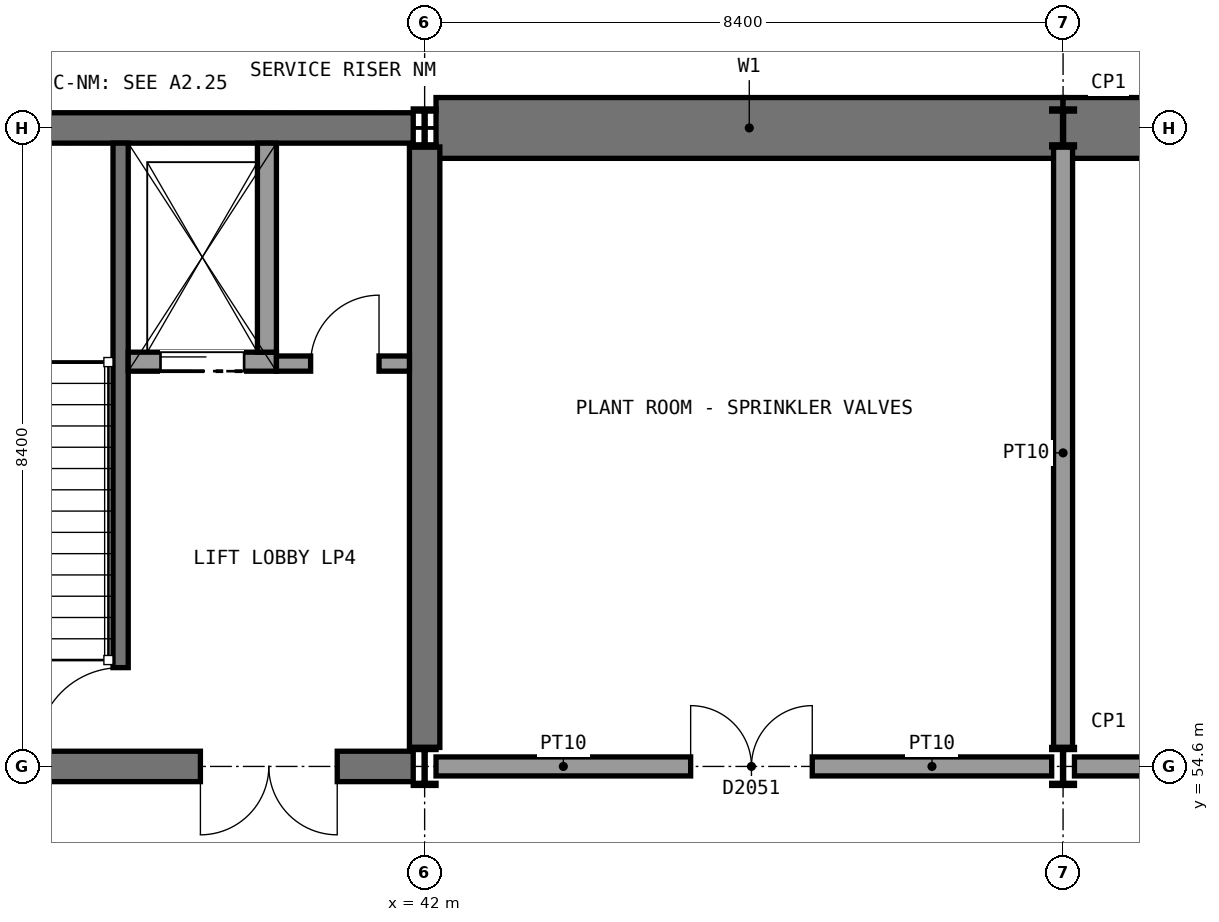
"""IFC4 building model, lengths in metres.
Left out: names, types, materials, properties, quantities, classifications, styles, units other than length and angle.
Written with IfcOpenShell. Run it as: python <this file> out.ifc"""

import sys

from ifc_helpers import new_model, si_unit, direction, frame, frame_2d, origin, origin_2d, place, context, subcontext, project, spatial, rectangle, i_section, extrude, element, fill, save


model = new_model("IFC4")
c1 = context("Model", 3, precision=1e-05, world=origin(), true_north=direction((0.0, 1.0)))
c2 = subcontext(c1, "Body", "Model", "MODEL_VIEW")
j1 = project(units=[si_unit("LENGTHUNIT", "METRE"), si_unit("PLANEANGLEUNIT", "RADIAN")], contexts=[c1])
p1 = place(None, origin())
s1 = spatial("IfcSite", under=j1, at=p1, CompositionType="ELEMENT")
p2 = place(p1, origin())
s2 = spatial("IfcBuilding", under=s1, at=p2, CompositionType="ELEMENT")
p3 = place(p2, frame((0.0, 0.0, -9.9)))
s3 = spatial("IfcBuildingStorey", under=s2, at=p3, CompositionType="ELEMENT", Elevation=-9.9)
p4 = place(p3, frame((42.15, 63.0, 0.0), z_axis=(0.0, 0.0, 1.0), x_axis=(1.0, 0.0, 0.0)))
e1 = element("IfcWall", 1, at=p4, inside=s3, PredefinedType="SOLIDWALL", context=c2, shape_type="SweptSolid", body=[
    extrude(rectangle(XDim=8.25, YDim=0.8, at=frame_2d((4.125, 0.0))), origin(), (0.0, 0.0, 1.0), 4.65),
])
p5 = place(p3, frame((50.4, 63.0, 0.0), z_axis=(0.0, 0.0, 1.0), x_axis=(1.0, 0.0, 0.0)))
e2 = element("IfcWall", 2, at=p5, inside=s3, PredefinedType="SOLIDWALL", context=c2, shape_type="SweptSolid", body=[
    extrude(rectangle(XDim=8.25, YDim=0.8, at=frame_2d((4.125, 0.0))), origin(), (0.0, 0.0, 1.0), 4.65),
])
p6 = place(p3, frame((33.75, 63.0, 0.0), z_axis=(0.0, 0.0, 1.0), x_axis=(1.0, 0.0, 0.0)))
e3 = element("IfcWall", 3, at=p6, inside=s3, PredefinedType="SHEAR", context=c2, shape_type="SweptSolid", body=[
    extrude(rectangle(XDim=8.1, YDim=0.4, at=frame_2d((4.05, 0.0))), origin(), (0.0, 0.0, 1.0), 4.65),
])
p7 = place(p3, frame((33.75, 54.6, 0.0), z_axis=(0.0, 0.0, 1.0), x_axis=(1.0, 0.0, 0.0)))
e4 = element("IfcWall", 4, at=p7, inside=s3, PredefinedType="SHEAR", context=c2, shape_type="SweptSolid", body=[
    extrude(rectangle(XDim=8.1, YDim=0.4, at=frame_2d((4.05, 0.0))), origin(), (0.0, 0.0, 1.0), 4.65),
])
p8 = place(p7, frame((1.15, 0.0, 0.0)))
e5 = element("IfcOpeningElement", 5, at=p8, cuts=e4, PredefinedType="OPENING", context=c2, shape_type="SweptSolid", body=[
    extrude(rectangle(XDim=1.8, YDim=2.1, at=frame_2d((0.9, 1.05))), frame((0.0, 0.21, 0.0), z_axis=(0.0, -1.0, 0.0), x_axis=(1.0, 0.0, 0.0)), (0.0, 0.0, 1.0), 0.42),
])
p9 = place(p7, frame((5.3, 0.0, 0.0)))
e6 = element("IfcOpeningElement", 6, at=p9, cuts=e4, PredefinedType="OPENING", context=c2, shape_type="SweptSolid", body=[
    extrude(rectangle(XDim=1.8, YDim=2.1, at=frame_2d((0.9, 1.05))), frame((0.0, 0.21, 0.0), z_axis=(0.0, -1.0, 0.0), x_axis=(1.0, 0.0, 0.0)), (0.0, 0.0, 1.0), 0.42),
])
p10 = place(p3, frame((42.0, 54.85, 0.0), z_axis=(0.0, 0.0, 1.0), x_axis=(0.0, 1.0, 0.0)))
e7 = element("IfcWall", 7, at=p10, inside=s3, PredefinedType="SHEAR", context=c2, shape_type="SweptSolid", body=[
    extrude(rectangle(XDim=7.9, YDim=0.4, at=frame_2d((3.95, 0.0))), origin(), (0.0, 0.0, 1.0), 4.65),
])
for number, where, z_axis, x_axis in (
    (8, (42.0, 54.6, 0.0), (0.0, 0.0, 1.0), (1.0, 0.0, 0.0)),
    (9, (42.0, 63.0, 0.0), (0.0, 0.0, 1.0), (1.0, 0.0, 0.0)),
    (10, (50.4, 54.6, 0.0), (0.0, 0.0, 1.0), (1.0, 0.0, 0.0)),
    (11, (50.4, 63.0, 0.0), (0.0, 0.0, 1.0), (1.0, 0.0, 0.0)),
):
    element("IfcColumn", number, at=place(p3, frame(where, z_axis=z_axis, x_axis=x_axis)), inside=s3, PredefinedType="COLUMN", context=c2, shape_type="SweptSolid", body=[
        extrude(i_section(OverallWidth=0.3, OverallDepth=0.5, WebThickness=0.014, FlangeThickness=0.028, FilletRadius=0.027, at=origin_2d()), origin(), (0.0, 0.0, 1.0), 5.0),
    ])
p11 = place(p3, frame((42.15, 54.6, 0.0), z_axis=(0.0, 0.0, 1.0), x_axis=(1.0, 0.0, 0.0)))
e12 = element("IfcWall", 12, at=p11, inside=s3, PredefinedType="SOLIDWALL", context=c2, shape_type="SweptSolid", body=[
    extrude(rectangle(XDim=8.1, YDim=0.25, at=frame_2d((4.05, 0.0))), origin(), (0.0, 0.0, 1.0), 4.65),
])
p12 = place(p11, frame((3.35, 0.0, 0.0)))
e13 = element("IfcOpeningElement", 13, at=p12, cuts=e12, PredefinedType="OPENING", context=c2, shape_type="SweptSolid", body=[
    extrude(rectangle(XDim=1.6, YDim=2.2, at=frame_2d((0.8, 1.1))), frame((0.0, 0.135, 0.0), z_axis=(0.0, -1.0, 0.0), x_axis=(1.0, 0.0, 0.0)), (0.0, 0.0, 1.0), 0.27),
])
p13 = place(p3, frame((50.55, 54.6, 0.0), z_axis=(0.0, 0.0, 1.0), x_axis=(1.0, 0.0, 0.0)))
e14 = element("IfcWall", 14, at=p13, inside=s3, PredefinedType="SOLIDWALL", context=c2, shape_type="SweptSolid", body=[
    extrude(rectangle(XDim=8.1, YDim=0.25, at=frame_2d((4.05, 0.0))), origin(), (0.0, 0.0, 1.0), 4.65),
])
p14 = place(p13, frame((3.35, 0.0, 0.0)))
e15 = element("IfcOpeningElement", 15, at=p14, cuts=e14, PredefinedType="OPENING", context=c2, shape_type="SweptSolid", body=[
    extrude(rectangle(XDim=1.6, YDim=2.2, at=frame_2d((0.8, 1.1))), frame((0.0, 0.135, 0.0), z_axis=(0.0, -1.0, 0.0), x_axis=(1.0, 0.0, 0.0)), (0.0, 0.0, 1.0), 0.27),
])
p15 = place(p3, frame((50.4, 54.85, 0.0), z_axis=(0.0, 0.0, 1.0), x_axis=(0.0, 1.0, 0.0)))
e16 = element("IfcWall", 16, at=p15, inside=s3, PredefinedType="SOLIDWALL", context=c2, shape_type="SweptSolid", body=[
    extrude(rectangle(XDim=7.9, YDim=0.25, at=frame_2d((3.95, 0.0))), origin(), (0.0, 0.0, 1.0), 4.65),
])
p16 = place(p3, frame((38.0, 62.8, 0.0), z_axis=(0.0, 0.0, 1.0), x_axis=(0.0, -1.0, 0.0)))
e17 = element("IfcWall", 17, at=p16, inside=s3, PredefinedType="SHEAR", context=c2, shape_type="SweptSolid", body=[
    extrude(rectangle(XDim=8.0, YDim=0.2, at=frame_2d((4.0, 0.0))), origin(), (0.0, 0.0, 1.0), 4.65),
])
p17 = place(p16, frame((6.9, 0.0, 0.0)))
e18 = element("IfcOpeningElement", 18, at=p17, cuts=e17, PredefinedType="OPENING", context=c2, shape_type="SweptSolid", body=[
    extrude(rectangle(XDim=1.11, YDim=2.1, at=frame_2d((0.555, 1.05))), frame((0.0, 0.11, 0.0), z_axis=(0.0, -1.0, 0.0), x_axis=(1.0, 0.0, 0.0)), (0.0, 0.0, 1.0), 0.22),
])
p18 = place(p3, frame((38.1, 59.925, -1.4), z_axis=(0.0, 0.0, 1.0), x_axis=(1.0, 0.0, 0.0)))
e19 = element("IfcWall", 19, at=p18, inside=s3, PredefinedType="SOLIDWALL", context=c2, shape_type="SweptSolid", body=[
    extrude(rectangle(XDim=1.95, YDim=0.25, at=frame_2d((0.975, 0.0))), origin(), (0.0, 0.0, 1.0), 6.4),
])
p19 = place(p18, frame((0.425, 0.0, 1.4)))
e20 = element("IfcOpeningElement", 20, at=p19, cuts=e19, PredefinedType="OPENING", context=c2, shape_type="SweptSolid", body=[
    extrude(rectangle(XDim=1.1, YDim=2.1, at=frame_2d((0.55, 1.05))), frame((0.0, 0.135, 0.0), z_axis=(0.0, -1.0, 0.0), x_axis=(1.0, 0.0, 0.0)), (0.0, 0.0, 1.0), 0.27),
])
p20 = place(p3, frame((39.925, 62.8, -1.4), z_axis=(0.0, 0.0, 1.0), x_axis=(0.0, -1.0, 0.0)))
e21 = element("IfcWall", 21, at=p20, inside=s3, PredefinedType="SOLIDWALL", context=c2, shape_type="SweptSolid", body=[
    extrude(rectangle(XDim=2.75, YDim=0.25, at=frame_2d((1.375, 0.0))), origin(), (0.0, 0.0, 1.0), 6.4),
])
p21 = place(p3, frame((40.05, 59.9, 0.0), z_axis=(0.0, 0.0, 1.0), x_axis=(1.0, 0.0, 0.0)))
e22 = element("IfcWall", 22, at=p21, inside=s3, PredefinedType="PARTITIONING", context=c2, shape_type="SweptSolid", body=[
    extrude(rectangle(XDim=1.75, YDim=0.2, at=frame_2d((0.875, 0.0))), origin(), (0.0, 0.0, 1.0), 4.65),
])
p22 = place(p21, frame((0.45, 0.0, 0.0)))
e23 = element("IfcOpeningElement", 23, at=p22, cuts=e22, PredefinedType="OPENING", context=c2, shape_type="SweptSolid", body=[
    extrude(rectangle(XDim=0.9, YDim=2.1, at=frame_2d((0.45, 1.05))), frame((0.0, 0.11, 0.0), z_axis=(0.0, -1.0, 0.0), x_axis=(1.0, 0.0, 0.0)), (0.0, 0.0, 1.0), 0.22),
])
p23 = place(p12, origin())
e24 = element("IfcDoor", 24, at=p23, inside=s3, OperationType="DOUBLE_DOOR_SINGLE_SWING", PredefinedType="DOOR", context=c2, shape_type="SweptSolid", body=[
    extrude(rectangle(XDim=1.6, YDim=2.2, at=frame_2d((0.8, 1.1))), frame((0.0, 0.025, 0.0), z_axis=(0.0, -1.0, 0.0), x_axis=(1.0, 0.0, 0.0)), (0.0, 0.0, 1.0), 0.05),
])
fill(e13, e24)
p24 = place(p17, frame((1.1, 0.0, 0.0), z_axis=(0.0, 0.0, 1.0), x_axis=(-1.0, 0.0, 0.0)))
e25 = element("IfcDoor", 25, at=p24, inside=s3, OperationType="SINGLE_SWING_LEFT", PredefinedType="DOOR", context=c2, shape_type="SweptSolid", body=[
    extrude(rectangle(XDim=1.1, YDim=2.1, at=frame_2d((0.55, 1.05))), frame((0.0, 0.025, 0.0), z_axis=(0.0, -1.0, 0.0), x_axis=(1.0, 0.0, 0.0)), (0.0, 0.0, 1.0), 0.05),
])
fill(e18, e25)
p25 = place(p19, frame((1.1, 0.0, 0.0), z_axis=(0.0, 0.0, 1.0), x_axis=(-1.0, 0.0, 0.0)))
e26 = element("IfcDoor", 26, at=p25, inside=s3, OperationType="SLIDING_TO_RIGHT", PredefinedType="DOOR", context=c2, shape_type="SweptSolid", body=[
    extrude(rectangle(XDim=1.1, YDim=2.1, at=frame_2d((0.55, 1.05))), frame((0.0, 0.025, 0.0), z_axis=(0.0, -1.0, 0.0), x_axis=(1.0, 0.0, 0.0)), (0.0, 0.0, 1.0), 0.05),
])
fill(e20, e26)
p26 = place(p22, origin())
e27 = element("IfcDoor", 27, at=p26, inside=s3, OperationType="SINGLE_SWING_RIGHT", PredefinedType="DOOR", context=c2, shape_type="SweptSolid", body=[
    extrude(rectangle(XDim=0.9, YDim=2.1, at=frame_2d((0.45, 1.05))), frame((0.0, 0.025, 0.0), z_axis=(0.0, -1.0, 0.0), x_axis=(1.0, 0.0, 0.0)), (0.0, 0.0, 1.0), 0.05),
])
fill(e23, e27)
p27 = place(p9, frame((1.8, 0.0, 0.0), z_axis=(0.0, 0.0, 1.0), x_axis=(-1.0, 0.0, 0.0)))
e28 = element("IfcDoor", 28, at=p27, inside=s3, OperationType="DOUBLE_DOOR_SINGLE_SWING", PredefinedType="DOOR", context=c2, shape_type="SweptSolid", body=[
    extrude(rectangle(XDim=1.8, YDim=2.1, at=frame_2d((0.9, 1.05))), frame((0.0, 0.025, 0.0), z_axis=(0.0, -1.0, 0.0), x_axis=(1.0, 0.0, 0.0)), (0.0, 0.0, 1.0), 0.05),
])
fill(e6, e28)
save(model, sys.argv[1])
